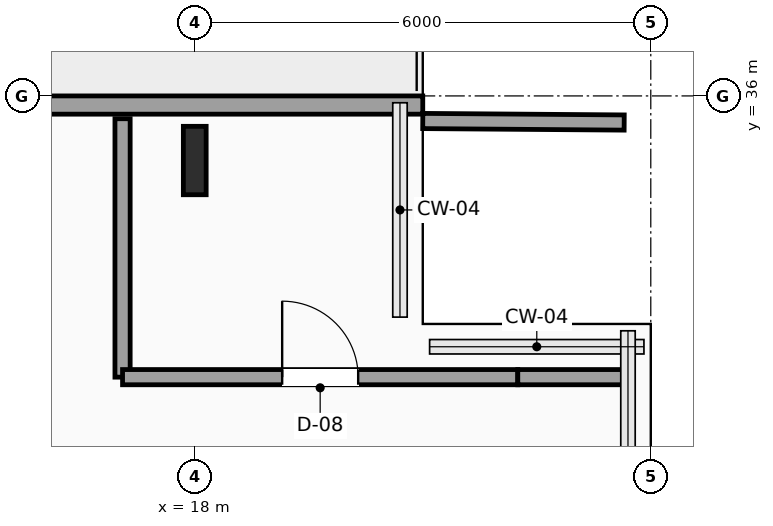
"""IFC4 building model, lengths in metres.
Left out: names, types, materials, properties, quantities, classifications, styles, units other than length and angle.
Written with IfcOpenShell. Run it as: python <this file> out.ifc"""

import sys

from ifc_helpers import new_model, si_unit, direction, frame, frame_2d, origin, origin_2d, place, context, subcontext, project, spatial, rectangle, i_section, extrude, element, fill, save


model = new_model("IFC4")
c1 = context("Model", 3, precision=1e-05, world=origin(), true_north=direction((0.0, 1.0)))
c2 = subcontext(c1, "Body", "Model", "MODEL_VIEW")
j1 = project(units=[si_unit("LENGTHUNIT", "METRE"), si_unit("PLANEANGLEUNIT", "RADIAN")], contexts=[c1])
p1 = place(None, origin())
s1 = spatial("IfcSite", under=j1, at=p1, CompositionType="ELEMENT")
p2 = place(p1, origin())
s2 = spatial("IfcBuilding", under=s1, at=p2, CompositionType="ELEMENT")
p3 = place(p2, frame((0.0, 0.0, 169.2)))
s3 = spatial("IfcBuildingStorey", under=s2, at=p3, CompositionType="ELEMENT", Elevation=169.2)
p4 = place(p3, frame((18.0, 35.15, 0.0), z_axis=(0.0, 0.0, 1.0), x_axis=(1.0, 0.0, 0.0)))
e1 = element("IfcColumn", 1, at=p4, inside=s3, PredefinedType="COLUMN", context=c2, shape_type="SweptSolid", body=[
    extrude(i_section(OverallWidth=0.3, OverallDepth=0.9, WebThickness=0.019, FlangeThickness=0.035, FilletRadius=0.03, at=origin_2d()), origin(), (0.0, 0.0, 1.0), 3.75),
])
p5 = place(p3, frame((3.0, 35.88, 0.0), z_axis=(0.0, 0.0, 1.0), x_axis=(1.0, 0.0, 0.0)))
e2 = element("IfcWall", 2, at=p5, inside=s3, PredefinedType="SOLIDWALL", context=c2, shape_type="SweptSolid", body=[
    extrude(rectangle(XDim=18.0, YDim=0.24, at=frame_2d((9.0, 0.0))), origin(), (0.0, 0.0, 1.0), 3.54),
])
p6 = place(p5, frame((9.7, 0.0, 0.0)))
e3 = element("IfcOpeningElement", 3, at=p6, cuts=e2, PredefinedType="OPENING", context=c2, shape_type="SweptSolid", body=[
    extrude(rectangle(XDim=1.8, YDim=2.4, at=frame_2d((0.9, 1.2))), frame((0.0, 0.13, 0.0), z_axis=(0.0, -1.0, 0.0), x_axis=(1.0, 0.0, 0.0)), (0.0, 0.0, 1.0), 0.26),
])
p7 = place(p3, frame((17.05, 35.7, 0.0), z_axis=(0.0, 0.0, 1.0), x_axis=(0.0, -1.0, 0.0)))
e4 = element("IfcWall", 4, at=p7, inside=s3, PredefinedType="PARTITIONING", context=c2, shape_type="SweptSolid", body=[
    extrude(rectangle(XDim=3.4, YDim=0.2, at=frame_2d((1.7, 0.0))), origin(), (0.0, 0.0, 1.0), 3.54),
])
p8 = place(p3, frame((17.05, 32.3, 0.0), z_axis=(0.0, 0.0, 1.0), x_axis=(1.0, 0.0, 0.0)))
e5 = element("IfcWall", 5, at=p8, inside=s3, PredefinedType="PARTITIONING", context=c2, shape_type="SweptSolid", body=[
    extrude(rectangle(XDim=5.2, YDim=0.2, at=frame_2d((2.6, 0.0))), origin(), (0.0, 0.0, 1.0), 3.132),
])
p9 = place(p8, frame((2.1, 0.0, 0.0)))
e6 = element("IfcOpeningElement", 6, at=p9, cuts=e5, PredefinedType="OPENING", context=c2, shape_type="SweptSolid", body=[
    extrude(rectangle(XDim=1.0, YDim=2.2, at=frame_2d((0.5, 1.1))), frame((0.0, 0.11, 0.0), z_axis=(0.0, -1.0, 0.0), x_axis=(1.0, 0.0, 0.0)), (0.0, 0.0, 1.0), 0.22),
])
p10 = place(p3, frame((22.25, 32.3, 0.0), z_axis=(0.0, 0.0, 1.0), x_axis=(1.0, 0.0, 0.0)))
e7 = element("IfcWall", 7, at=p10, inside=s3, PredefinedType="PARTITIONING", context=c2, shape_type="SweptSolid", body=[
    extrude(rectangle(XDim=1.45, YDim=0.2, at=frame_2d((0.725, 0.0))), origin(), (0.0, 0.0, 1.0), 3.54),
])
p11 = place(p3, frame((21.0, 35.67, 0.0), z_axis=(0.0, 0.0, 1.0), x_axis=(0.999970763357, -0.007646726862, 0.0)))
e8 = element("IfcWall", 8, at=p11, inside=s3, PredefinedType="PARTITIONING", context=c2, shape_type="SweptSolid", body=[
    extrude(rectangle(XDim=2.65, YDim=0.2, at=frame_2d((1.325, 0.0))), origin(), (0.0, 0.0, 1.0), 3.54),
])
p12 = place(p9, origin())
e9 = element("IfcDoor", 9, at=p12, inside=s3, OperationType="SINGLE_SWING_LEFT", PredefinedType="DOOR", context=c2, shape_type="SweptSolid", body=[
    extrude(rectangle(XDim=1.0, YDim=2.2, at=frame_2d((0.5, 1.1))), frame((0.0, 0.025, 0.0), z_axis=(0.0, -1.0, 0.0), x_axis=(1.0, 0.0, 0.0)), (0.0, 0.0, 1.0), 0.05),
])
fill(e6, e9)
save(model, sys.argv[1])
